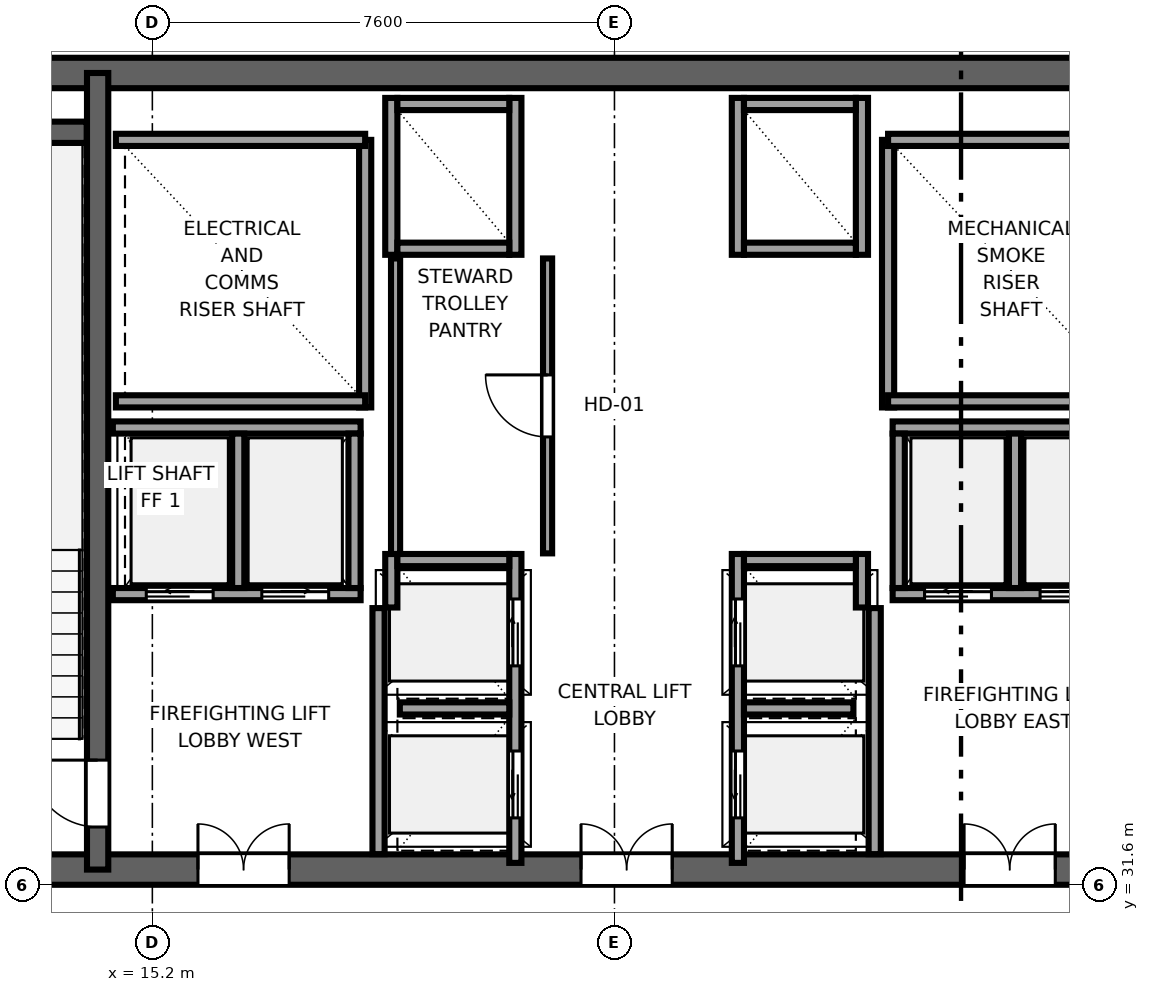
"""IFC4 building model, lengths in metres.
Left out: names, types, materials, properties, quantities, classifications, styles, units other than length and angle.
Written with IfcOpenShell. Run it as: python <this file> out.ifc"""

import sys

from ifc_helpers import new_model, si_unit, direction, frame, frame_2d, origin, place, context, subcontext, project, spatial, rectangle, extrude, source, transform, mapped, element, fill, save


model = new_model("IFC4")
c1 = context("Model", 3, precision=1e-05, world=origin(), true_north=direction((0.0, 1.0)))
c2 = subcontext(c1, "Body", "Model", "MODEL_VIEW")
j1 = project(units=[si_unit("LENGTHUNIT", "METRE"), si_unit("PLANEANGLEUNIT", "RADIAN")], contexts=[c1])
p1 = place(None, origin())
s1 = spatial("IfcSite", under=j1, at=p1, CompositionType="ELEMENT")
p2 = place(p1, origin())
s2 = spatial("IfcBuilding", under=s1, at=p2, CompositionType="ELEMENT")
p3 = place(p2, frame((0.0, 0.0, 209.7)))
s3 = spatial("IfcBuildingStorey", under=s2, at=p3, CompositionType="ELEMENT", Elevation=209.7)
p4 = place(p3, frame((10.0, 31.85, 0.0), z_axis=(0.0, 0.0, 1.0), x_axis=(1.0, 0.0, 0.0)))
e1 = element("IfcWall", 1, at=p4, inside=s3, PredefinedType="SHEAR", context=c2, shape_type="SweptSolid", body=[
    extrude(rectangle(XDim=26.0, YDim=0.5, at=frame_2d((13.0, 0.0))), origin(), (0.0, 0.0, 1.0), 3.55),
])
p5 = place(p4, frame((7.45, 0.0, 0.0), z_axis=(0.0, 0.0, 1.0), x_axis=(-1.0, 0.0, 0.0)))
e2 = element("IfcOpeningElement", 2, at=p5, cuts=e1, PredefinedType="OPENING", context=c2, shape_type="SweptSolid", body=[
    extrude(rectangle(XDim=1.5, YDim=2.04, at=frame_2d((0.75, 1.02))), frame((0.0, 0.26, 0.0), z_axis=(0.0, -1.0, 0.0), x_axis=(1.0, 0.0, 0.0)), (0.0, 0.0, 1.0), 0.52),
])
p6 = place(p4, frame((13.75, 0.0, 0.0), z_axis=(0.0, 0.0, 1.0), x_axis=(-1.0, 0.0, 0.0)))
e3 = element("IfcOpeningElement", 3, at=p6, cuts=e1, PredefinedType="OPENING", context=c2, shape_type="SweptSolid", body=[
    extrude(rectangle(XDim=1.5, YDim=2.04, at=frame_2d((0.75, 1.02))), frame((0.0, 0.26, 0.0), z_axis=(0.0, -1.0, 0.0), x_axis=(1.0, 0.0, 0.0)), (0.0, 0.0, 1.0), 0.52),
])
p7 = place(p4, frame((20.05, 0.0, 0.0), z_axis=(0.0, 0.0, 1.0), x_axis=(-1.0, 0.0, 0.0)))
e4 = element("IfcOpeningElement", 4, at=p7, cuts=e1, PredefinedType="OPENING", context=c2, shape_type="SweptSolid", body=[
    extrude(rectangle(XDim=1.5, YDim=2.04, at=frame_2d((0.75, 1.02))), frame((0.0, 0.26, 0.0), z_axis=(0.0, -1.0, 0.0), x_axis=(1.0, 0.0, 0.0)), (0.0, 0.0, 1.0), 0.52),
])
p8 = place(p3, frame((10.0, 44.95, 0.0), z_axis=(0.0, 0.0, 1.0), x_axis=(1.0, 0.0, 0.0)))
e5 = element("IfcWall", 5, at=p8, inside=s3, PredefinedType="SHEAR", context=c2, shape_type="SweptSolid", body=[
    extrude(rectangle(XDim=26.0, YDim=0.5, at=frame_2d((13.0, 0.0))), origin(), (0.0, 0.0, 1.0), 3.55),
])
p9 = place(p3, frame((14.3, 31.85, 0.0), z_axis=(0.0, 0.0, 1.0), x_axis=(0.0, 1.0, 0.0)))
e6 = element("IfcWall", 6, at=p9, inside=s3, PredefinedType="SHEAR", context=c2, shape_type="SweptSolid", body=[
    extrude(rectangle(XDim=13.1, YDim=0.35, at=frame_2d((6.55, 0.0))), origin(), (0.0, 0.0, 1.0), 3.55),
])
p10 = place(p9, frame((0.7, 0.0, 0.0)))
e7 = element("IfcOpeningElement", 7, at=p10, cuts=e6, PredefinedType="OPENING", context=c2, shape_type="SweptSolid", body=[
    extrude(rectangle(XDim=1.1, YDim=2.12, at=frame_2d((0.55, 1.06))), frame((0.0, 0.185, 0.0), z_axis=(0.0, -1.0, 0.0), x_axis=(1.0, 0.0, 0.0)), (0.0, 0.0, 1.0), 0.37),
])
p11 = place(p3, frame((10.52, 43.975, 0.0), z_axis=(0.0, 0.0, 1.0), x_axis=(1.0, 0.0, 0.0)))
e8 = element("IfcWall", 8, at=p11, inside=s3, PredefinedType="SHEAR", context=c2, shape_type="SweptSolid", body=[
    extrude(rectangle(XDim=3.6, YDim=0.35, at=frame_2d((1.8, 0.0))), origin(), (0.0, 0.0, 1.0), 3.55),
])
p12 = place(p3, frame((18.7, 39.45, 0.0), z_axis=(0.0, 0.0, 1.0), x_axis=(0.0, 1.0, 0.0)))
e9 = element("IfcWall", 9, at=p12, inside=s3, PredefinedType="SOLIDWALL", context=c2, shape_type="SweptSolid", body=[
    extrude(rectangle(XDim=4.4, YDim=0.2, at=frame_2d((2.2, 0.0))), origin(), (0.0, 0.0, 1.0), 3.37),
])
for number, where, z_axis, x_axis in (
    (10, (14.6, 39.55, 0.0), (0.0, 0.0, 1.0), (1.0, 0.0, 0.0)),
    (11, (14.6, 43.85, 0.0), (0.0, 0.0, 1.0), (1.0, 0.0, 0.0)),
):
    element("IfcWall", number, at=place(p3, frame(where, z_axis=z_axis, x_axis=x_axis)), inside=s3, PredefinedType="SOLIDWALL", context=c2, shape_type="SweptSolid", body=[
        extrude(rectangle(XDim=4.1, YDim=0.2, at=frame_2d((2.05, 0.0))), origin(), (0.0, 0.0, 1.0), 3.37),
    ])
p13 = place(p3, frame((27.3, 39.45, 0.0), z_axis=(0.0, 0.0, 1.0), x_axis=(0.0, 1.0, 0.0)))
e12 = element("IfcWall", 12, at=p13, inside=s3, PredefinedType="SOLIDWALL", context=c2, shape_type="SweptSolid", body=[
    extrude(rectangle(XDim=4.4, YDim=0.2, at=frame_2d((2.2, 0.0))), origin(), (0.0, 0.0, 1.0), 3.37),
])
for number, where, z_axis, x_axis in (
    (13, (27.3, 39.55, 0.0), (0.0, 0.0, 1.0), (1.0, 0.0, 0.0)),
    (14, (27.3, 43.85, 0.0), (0.0, 0.0, 1.0), (1.0, 0.0, 0.0)),
):
    element("IfcWall", number, at=place(p3, frame(where, z_axis=z_axis, x_axis=x_axis)), inside=s3, PredefinedType="SOLIDWALL", context=c2, shape_type="SweptSolid", body=[
        extrude(rectangle(XDim=4.1, YDim=0.2, at=frame_2d((2.05, 0.0))), origin(), (0.0, 0.0, 1.0), 3.37),
    ])
for number, where, z_axis, x_axis in (
    (15, (18.92, 32.104, 0.0), (0.0, 0.0, 1.0), (0.0, 1.0, 0.0)),
    (16, (27.08, 32.104, 0.0), (0.0, 0.0, 1.0), (0.0, 1.0, 0.0)),
):
    element("IfcWall", number, at=place(p3, frame(where, z_axis=z_axis, x_axis=x_axis)), inside=s3, PredefinedType="SOLIDWALL", context=c2, shape_type="SweptSolid", body=[
        extrude(rectangle(XDim=4.046, YDim=0.2, at=frame_2d((2.023, 0.0))), origin(), (0.0, 0.0, 1.0), 3.37),
    ])
p14 = place(p3, frame((21.17, 31.96, 0.0), z_axis=(0.0, 0.0, 1.0), x_axis=(0.0, 1.0, 0.0)))
e17 = element("IfcWall", 17, at=p14, inside=s3, PredefinedType="SOLIDWALL", context=c2, shape_type="SweptSolid", body=[
    extrude(rectangle(XDim=5.08, YDim=0.2, at=frame_2d((2.54, 0.0))), origin(), (0.0, 0.0, 1.0), 3.37),
])
p15 = place(p14, frame((0.74, 0.0, 0.0)))
e18 = element("IfcOpeningElement", 18, at=p15, cuts=e17, PredefinedType="OPENING", context=c2, shape_type="SweptSolid", body=[
    extrude(rectangle(XDim=1.1, YDim=2.12, at=frame_2d((0.55, 1.06))), frame((0.0, 0.11, 0.0), z_axis=(0.0, -1.0, 0.0), x_axis=(1.0, 0.0, 0.0)), (0.0, 0.0, 1.0), 0.22),
])
p16 = place(p14, frame((3.24, 0.0, 0.0)))
e19 = element("IfcOpeningElement", 19, at=p16, cuts=e17, PredefinedType="OPENING", context=c2, shape_type="SweptSolid", body=[
    extrude(rectangle(XDim=1.1, YDim=2.12, at=frame_2d((0.55, 1.06))), frame((0.0, 0.11, 0.0), z_axis=(0.0, -1.0, 0.0), x_axis=(1.0, 0.0, 0.0)), (0.0, 0.0, 1.0), 0.22),
])
p17 = place(p3, frame((19.13, 36.16, 0.0), z_axis=(0.0, 0.0, 1.0), x_axis=(0.0, 1.0, 0.0)))
e20 = element("IfcWall", 20, at=p17, inside=s3, PredefinedType="SOLIDWALL", context=c2, shape_type="SweptSolid", body=[
    extrude(rectangle(XDim=0.88, YDim=0.2, at=frame_2d((0.44, 0.0))), origin(), (0.0, 0.0, 1.0), 3.37),
])
p18 = place(p3, frame((19.23, 36.94, 0.0), z_axis=(0.0, 0.0, 1.0), x_axis=(1.0, 0.0, 0.0)))
e21 = element("IfcWall", 21, at=p18, inside=s3, PredefinedType="SOLIDWALL", context=c2, shape_type="SweptSolid", body=[
    extrude(rectangle(XDim=1.84, YDim=0.2, at=frame_2d((0.92, 0.0))), origin(), (0.0, 0.0, 1.0), 3.37),
])
p19 = place(p3, frame((19.27, 34.5, 0.0), z_axis=(0.0, 0.0, 1.0), x_axis=(1.0, 0.0, 0.0)))
e22 = element("IfcWall", 22, at=p19, inside=s3, PredefinedType="SOLIDWALL", context=c2, shape_type="SweptSolid", body=[
    extrude(rectangle(XDim=1.8, YDim=0.2, at=frame_2d((0.9, 0.0))), origin(), (0.0, 0.0, 1.0), 3.37),
])
for number, where, z_axis, x_axis in (
    (23, (21.17, 41.96, 0.0), (0.0, 0.0, 1.0), (0.0, 1.0, 0.0)),
    (24, (19.13, 41.96, 0.0), (0.0, 0.0, 1.0), (0.0, 1.0, 0.0)),
):
    element("IfcWall", number, at=place(p3, frame(where, z_axis=z_axis, x_axis=x_axis)), inside=s3, PredefinedType="SOLIDWALL", context=c2, shape_type="SweptSolid", body=[
        extrude(rectangle(XDim=2.58, YDim=0.2, at=frame_2d((1.29, 0.0))), origin(), (0.0, 0.0, 1.0), 3.37),
    ])
for number, where, z_axis, x_axis in (
    (25, (19.23, 42.06, 0.0), (0.0, 0.0, 1.0), (1.0, 0.0, 0.0)),
    (26, (19.23, 44.44, 0.0), (0.0, 0.0, 1.0), (1.0, 0.0, 0.0)),
):
    element("IfcWall", number, at=place(p3, frame(where, z_axis=z_axis, x_axis=x_axis)), inside=s3, PredefinedType="SOLIDWALL", context=c2, shape_type="SweptSolid", body=[
        extrude(rectangle(XDim=1.84, YDim=0.2, at=frame_2d((0.92, 0.0))), origin(), (0.0, 0.0, 1.0), 3.37),
    ])
p20 = place(p3, frame((27.375, 36.38, 0.0), z_axis=(0.0, 0.0, 1.0), x_axis=(1.0, 0.0, 0.0)))
e27 = element("IfcWall", 27, at=p20, inside=s3, PredefinedType="SOLIDWALL", context=c2, shape_type="SweptSolid", body=[
    extrude(rectangle(XDim=4.075, YDim=0.2, at=frame_2d((2.038, 0.0))), origin(), (0.0, 0.0, 1.0), 3.37),
])
p21 = place(p20, frame((0.525, 0.0, 0.0)))
e28 = element("IfcOpeningElement", 28, at=p21, cuts=e27, PredefinedType="OPENING", context=c2, shape_type="SweptSolid", body=[
    extrude(rectangle(XDim=1.1, YDim=2.12, at=frame_2d((0.55, 1.06))), frame((0.0, 0.11, 0.0), z_axis=(0.0, -1.0, 0.0), x_axis=(1.0, 0.0, 0.0)), (0.0, 0.0, 1.0), 0.22),
])
p22 = place(p20, frame((2.425, 0.0, 0.0)))
e29 = element("IfcOpeningElement", 29, at=p22, cuts=e27, PredefinedType="OPENING", context=c2, shape_type="SweptSolid", body=[
    extrude(rectangle(XDim=1.1, YDim=2.12, at=frame_2d((0.55, 1.06))), frame((0.0, 0.11, 0.0), z_axis=(0.0, -1.0, 0.0), x_axis=(1.0, 0.0, 0.0)), (0.0, 0.0, 1.0), 0.22),
])
p23 = place(p3, frame((27.375, 39.12, 0.0), z_axis=(0.0, 0.0, 1.0), x_axis=(1.0, 0.0, 0.0)))
e30 = element("IfcWall", 30, at=p23, inside=s3, PredefinedType="SOLIDWALL", context=c2, shape_type="SweptSolid", body=[
    extrude(rectangle(XDim=4.075, YDim=0.2, at=frame_2d((2.038, 0.0))), origin(), (0.0, 0.0, 1.0), 3.37),
])
for number, where, z_axis, x_axis in (
    (31, (27.475, 36.48, 0.0), (0.0, 0.0, 1.0), (0.0, 1.0, 0.0)),
    (32, (29.387, 36.48, 0.0), (0.0, 0.0, 1.0), (0.0, 1.0, 0.0)),
):
    element("IfcWall", number, at=place(p3, frame(where, z_axis=z_axis, x_axis=x_axis)), inside=s3, PredefinedType="SOLIDWALL", context=c2, shape_type="SweptSolid", body=[
        extrude(rectangle(XDim=2.54, YDim=0.2, at=frame_2d((1.27, 0.0))), origin(), (0.0, 0.0, 1.0), 3.37),
    ])
p24 = place(p3, frame((14.55, 36.38, 0.0), z_axis=(0.0, 0.0, 1.0), x_axis=(1.0, 0.0, 0.0)))
e33 = element("IfcWall", 33, at=p24, inside=s3, PredefinedType="SOLIDWALL", context=c2, shape_type="SweptSolid", body=[
    extrude(rectangle(XDim=4.075, YDim=0.2, at=frame_2d((2.038, 0.0))), origin(), (0.0, 0.0, 1.0), 3.37),
])
p25 = place(p24, frame((0.55, 0.0, 0.0)))
e34 = element("IfcOpeningElement", 34, at=p25, cuts=e33, PredefinedType="OPENING", context=c2, shape_type="SweptSolid", body=[
    extrude(rectangle(XDim=1.1, YDim=2.12, at=frame_2d((0.55, 1.06))), frame((0.0, 0.11, 0.0), z_axis=(0.0, -1.0, 0.0), x_axis=(1.0, 0.0, 0.0)), (0.0, 0.0, 1.0), 0.22),
])
p26 = place(p24, frame((2.45, 0.0, 0.0)))
e35 = element("IfcOpeningElement", 35, at=p26, cuts=e33, PredefinedType="OPENING", context=c2, shape_type="SweptSolid", body=[
    extrude(rectangle(XDim=1.1, YDim=2.12, at=frame_2d((0.55, 1.06))), frame((0.0, 0.11, 0.0), z_axis=(0.0, -1.0, 0.0), x_axis=(1.0, 0.0, 0.0)), (0.0, 0.0, 1.0), 0.22),
])
p27 = place(p3, frame((14.55, 39.12, 0.0), z_axis=(0.0, 0.0, 1.0), x_axis=(1.0, 0.0, 0.0)))
e36 = element("IfcWall", 36, at=p27, inside=s3, PredefinedType="SOLIDWALL", context=c2, shape_type="SweptSolid", body=[
    extrude(rectangle(XDim=4.075, YDim=0.2, at=frame_2d((2.038, 0.0))), origin(), (0.0, 0.0, 1.0), 3.37),
])
for number, where, z_axis, x_axis in (
    (37, (18.525, 36.48, 0.0), (0.0, 0.0, 1.0), (0.0, 1.0, 0.0)),
    (38, (16.613, 36.48, 0.0), (0.0, 0.0, 1.0), (0.0, 1.0, 0.0)),
):
    element("IfcWall", number, at=place(p3, frame(where, z_axis=z_axis, x_axis=x_axis)), inside=s3, PredefinedType="SOLIDWALL", context=c2, shape_type="SweptSolid", body=[
        extrude(rectangle(XDim=2.54, YDim=0.2, at=frame_2d((1.27, 0.0))), origin(), (0.0, 0.0, 1.0), 3.37),
    ])
p28 = place(p3, frame((24.83, 31.96, 0.0), z_axis=(0.0, 0.0, 1.0), x_axis=(0.0, 1.0, 0.0)))
e39 = element("IfcWall", 39, at=p28, inside=s3, PredefinedType="SOLIDWALL", context=c2, shape_type="SweptSolid", body=[
    extrude(rectangle(XDim=5.08, YDim=0.2, at=frame_2d((2.54, 0.0))), origin(), (0.0, 0.0, 1.0), 3.37),
])
p29 = place(p28, frame((0.74, 0.0, 0.0)))
e40 = element("IfcOpeningElement", 40, at=p29, cuts=e39, PredefinedType="OPENING", context=c2, shape_type="SweptSolid", body=[
    extrude(rectangle(XDim=1.1, YDim=2.12, at=frame_2d((0.55, 1.06))), frame((0.0, 0.11, 0.0), z_axis=(0.0, -1.0, 0.0), x_axis=(1.0, 0.0, 0.0)), (0.0, 0.0, 1.0), 0.22),
])
p30 = place(p28, frame((3.24, 0.0, 0.0)))
e41 = element("IfcOpeningElement", 41, at=p30, cuts=e39, PredefinedType="OPENING", context=c2, shape_type="SweptSolid", body=[
    extrude(rectangle(XDim=1.1, YDim=2.12, at=frame_2d((0.55, 1.06))), frame((0.0, 0.11, 0.0), z_axis=(0.0, -1.0, 0.0), x_axis=(1.0, 0.0, 0.0)), (0.0, 0.0, 1.0), 0.22),
])
p31 = place(p3, frame((26.87, 36.16, 0.0), z_axis=(0.0, 0.0, 1.0), x_axis=(0.0, 1.0, 0.0)))
e42 = element("IfcWall", 42, at=p31, inside=s3, PredefinedType="SOLIDWALL", context=c2, shape_type="SweptSolid", body=[
    extrude(rectangle(XDim=0.88, YDim=0.2, at=frame_2d((0.44, 0.0))), origin(), (0.0, 0.0, 1.0), 3.37),
])
p32 = place(p3, frame((24.93, 36.94, 0.0), z_axis=(0.0, 0.0, 1.0), x_axis=(1.0, 0.0, 0.0)))
e43 = element("IfcWall", 43, at=p32, inside=s3, PredefinedType="SOLIDWALL", context=c2, shape_type="SweptSolid", body=[
    extrude(rectangle(XDim=1.84, YDim=0.2, at=frame_2d((0.92, 0.0))), origin(), (0.0, 0.0, 1.0), 3.37),
])
p33 = place(p3, frame((24.93, 34.5, 0.0), z_axis=(0.0, 0.0, 1.0), x_axis=(1.0, 0.0, 0.0)))
e44 = element("IfcWall", 44, at=p33, inside=s3, PredefinedType="SOLIDWALL", context=c2, shape_type="SweptSolid", body=[
    extrude(rectangle(XDim=1.8, YDim=0.2, at=frame_2d((0.9, 0.0))), origin(), (0.0, 0.0, 1.0), 3.37),
])
for number, where, z_axis, x_axis in (
    (45, (24.83, 41.96, 0.0), (0.0, 0.0, 1.0), (0.0, 1.0, 0.0)),
    (46, (26.87, 41.96, 0.0), (0.0, 0.0, 1.0), (0.0, 1.0, 0.0)),
):
    element("IfcWall", number, at=place(p3, frame(where, z_axis=z_axis, x_axis=x_axis)), inside=s3, PredefinedType="SOLIDWALL", context=c2, shape_type="SweptSolid", body=[
        extrude(rectangle(XDim=2.58, YDim=0.2, at=frame_2d((1.29, 0.0))), origin(), (0.0, 0.0, 1.0), 3.37),
    ])
for number, where, z_axis, x_axis in (
    (47, (24.93, 42.06, 0.0), (0.0, 0.0, 1.0), (1.0, 0.0, 0.0)),
    (48, (24.93, 44.44, 0.0), (0.0, 0.0, 1.0), (1.0, 0.0, 0.0)),
):
    element("IfcWall", number, at=place(p3, frame(where, z_axis=z_axis, x_axis=x_axis)), inside=s3, PredefinedType="SOLIDWALL", context=c2, shape_type="SweptSolid", body=[
        extrude(rectangle(XDim=1.84, YDim=0.2, at=frame_2d((0.92, 0.0))), origin(), (0.0, 0.0, 1.0), 3.37),
    ])
p34 = place(p3, frame((21.7, 37.05, 0.0), z_axis=(0.0, 0.0, 1.0), x_axis=(0.0, 1.0, 0.0)))
e49 = element("IfcWall", 49, at=p34, inside=s3, PredefinedType="PARTITIONING", context=c2, shape_type="SweptSolid", body=[
    extrude(rectangle(XDim=4.85, YDim=0.15, at=frame_2d((2.425, 0.0))), origin(), (0.0, 0.0, 1.0), 3.37),
])
p35 = place(p34, frame((1.915, 0.0, 0.0)))
e50 = element("IfcOpeningElement", 50, at=p35, cuts=e49, PredefinedType="OPENING", context=c2, shape_type="SweptSolid", body=[
    extrude(rectangle(XDim=1.02, YDim=2.03, at=frame_2d((0.51, 1.015))), frame((0.0, 0.085, 0.0), z_axis=(0.0, -1.0, 0.0), x_axis=(1.0, 0.0, 0.0)), (0.0, 0.0, 1.0), 0.17),
])
p36 = place(p3, frame((19.2, 37.04, 0.0), z_axis=(0.0, 0.0, 1.0), x_axis=(0.0, 1.0, 0.0)))
e51 = element("IfcWall", 51, at=p36, inside=s3, PredefinedType="PARTITIONING", context=c2, shape_type="SweptSolid", body=[
    extrude(rectangle(XDim=4.86, YDim=0.15, at=frame_2d((2.43, 0.0))), origin(), (0.0, 0.0, 1.0), 3.37),
])
m1 = source(origin(), c2, "Body", "SweptSolid", [
    extrude(rectangle(XDim=1.1, YDim=2.12, at=frame_2d((0.55, 1.06))), frame((0.0, 0.025, 0.0), z_axis=(0.0, -1.0, 0.0), x_axis=(1.0, 0.0, 0.0)), (0.0, 0.0, 1.0), 0.05),
])
p37 = place(p10, origin())
e52 = element("IfcDoor", 52, at=p37, inside=s3, OperationType="SINGLE_SWING_RIGHT", PredefinedType="DOOR", context=c2, shape_type="MappedRepresentation", body=[
    mapped(m1, transform((0.0, 0.0, 0.0), x_axis=(1.0, 0.0, 0.0), y_axis=(0.0, 1.0, 0.0), z_axis=(0.0, 0.0, 1.0), scale=1.0)),
])
fill(e7, e52)
m2 = source(origin(), c2, "Body", "SweptSolid", [
    extrude(rectangle(XDim=1.5, YDim=2.04, at=frame_2d((0.75, 1.02))), frame((0.0, 0.025, 0.0), z_axis=(0.0, -1.0, 0.0), x_axis=(1.0, 0.0, 0.0)), (0.0, 0.0, 1.0), 0.05),
])
p38 = place(p5, origin())
e53 = element("IfcDoor", 53, at=p38, inside=s3, OperationType="DOUBLE_DOOR_SINGLE_SWING", PredefinedType="DOOR", context=c2, shape_type="MappedRepresentation", body=[
    mapped(m2, transform((0.0, 0.0, 0.0), x_axis=(1.0, 0.0, 0.0), y_axis=(0.0, 1.0, 0.0), z_axis=(0.0, 0.0, 1.0), scale=1.0)),
])
fill(e2, e53)
p39 = place(p6, origin())
e54 = element("IfcDoor", 54, at=p39, inside=s3, OperationType="DOUBLE_DOOR_SINGLE_SWING", PredefinedType="DOOR", context=c2, shape_type="MappedRepresentation", body=[
    mapped(m2, transform((0.0, 0.0, 0.0), x_axis=(1.0, 0.0, 0.0), y_axis=(0.0, 1.0, 0.0), z_axis=(0.0, 0.0, 1.0), scale=1.0)),
])
fill(e3, e54)
p40 = place(p7, origin())
e55 = element("IfcDoor", 55, at=p40, inside=s3, OperationType="DOUBLE_DOOR_SINGLE_SWING", PredefinedType="DOOR", context=c2, shape_type="MappedRepresentation", body=[
    mapped(m2, transform((0.0, 0.0, 0.0), x_axis=(1.0, 0.0, 0.0), y_axis=(0.0, 1.0, 0.0), z_axis=(0.0, 0.0, 1.0), scale=1.0)),
])
fill(e4, e55)
m3 = source(origin(), c2, "Body", "SweptSolid", [
    extrude(rectangle(XDim=1.1, YDim=2.12, at=frame_2d((0.55, 1.06))), frame((0.0, 0.025, 0.0), z_axis=(0.0, -1.0, 0.0), x_axis=(1.0, 0.0, 0.0)), (0.0, 0.0, 1.0), 0.05),
])
p41 = place(p15, origin())
e56 = element("IfcDoor", 56, at=p41, inside=s3, OperationType="SLIDING_TO_LEFT", PredefinedType="DOOR", context=c2, shape_type="MappedRepresentation", body=[
    mapped(m3, transform((0.0, 0.0, 0.0), x_axis=(1.0, 0.0, 0.0), y_axis=(0.0, 1.0, 0.0), z_axis=(0.0, 0.0, 1.0), scale=1.0)),
])
fill(e18, e56)
p42 = place(p16, origin())
e57 = element("IfcDoor", 57, at=p42, inside=s3, OperationType="SLIDING_TO_RIGHT", PredefinedType="DOOR", context=c2, shape_type="MappedRepresentation", body=[
    mapped(m3, transform((0.0, 0.0, 0.0), x_axis=(1.0, 0.0, 0.0), y_axis=(0.0, 1.0, 0.0), z_axis=(0.0, 0.0, 1.0), scale=1.0)),
])
fill(e19, e57)
p43 = place(p21, origin())
e58 = element("IfcDoor", 58, at=p43, inside=s3, OperationType="SLIDING_TO_LEFT", PredefinedType="DOOR", context=c2, shape_type="MappedRepresentation", body=[
    mapped(m3, transform((0.0, 0.0, 0.0), x_axis=(1.0, 0.0, 0.0), y_axis=(0.0, 1.0, 0.0), z_axis=(0.0, 0.0, 1.0), scale=1.0)),
])
fill(e28, e58)
p44 = place(p22, origin())
e59 = element("IfcDoor", 59, at=p44, inside=s3, OperationType="SLIDING_TO_RIGHT", PredefinedType="DOOR", context=c2, shape_type="MappedRepresentation", body=[
    mapped(m3, transform((0.0, 0.0, 0.0), x_axis=(1.0, 0.0, 0.0), y_axis=(0.0, 1.0, 0.0), z_axis=(0.0, 0.0, 1.0), scale=1.0)),
])
fill(e29, e59)
p45 = place(p25, origin())
e60 = element("IfcDoor", 60, at=p45, inside=s3, OperationType="SLIDING_TO_LEFT", PredefinedType="DOOR", context=c2, shape_type="MappedRepresentation", body=[
    mapped(m3, transform((0.0, 0.0, 0.0), x_axis=(1.0, 0.0, 0.0), y_axis=(0.0, 1.0, 0.0), z_axis=(0.0, 0.0, 1.0), scale=1.0)),
])
fill(e34, e60)
p46 = place(p26, origin())
e61 = element("IfcDoor", 61, at=p46, inside=s3, OperationType="SLIDING_TO_RIGHT", PredefinedType="DOOR", context=c2, shape_type="MappedRepresentation", body=[
    mapped(m3, transform((0.0, 0.0, 0.0), x_axis=(1.0, 0.0, 0.0), y_axis=(0.0, 1.0, 0.0), z_axis=(0.0, 0.0, 1.0), scale=1.0)),
])
fill(e35, e61)
p47 = place(p29, origin())
e62 = element("IfcDoor", 62, at=p47, inside=s3, OperationType="SLIDING_TO_LEFT", PredefinedType="DOOR", context=c2, shape_type="MappedRepresentation", body=[
    mapped(m3, transform((0.0, 0.0, 0.0), x_axis=(1.0, 0.0, 0.0), y_axis=(0.0, 1.0, 0.0), z_axis=(0.0, 0.0, 1.0), scale=1.0)),
])
fill(e40, e62)
p48 = place(p30, origin())
e63 = element("IfcDoor", 63, at=p48, inside=s3, OperationType="SLIDING_TO_RIGHT", PredefinedType="DOOR", context=c2, shape_type="MappedRepresentation", body=[
    mapped(m3, transform((0.0, 0.0, 0.0), x_axis=(1.0, 0.0, 0.0), y_axis=(0.0, 1.0, 0.0), z_axis=(0.0, 0.0, 1.0), scale=1.0)),
])
fill(e41, e63)
m4 = source(origin(), c2, "Body", "SweptSolid", [
    extrude(rectangle(XDim=1.02, YDim=2.03, at=frame_2d((0.51, 1.015))), frame((0.0, 0.025, 0.0), z_axis=(0.0, -1.0, 0.0), x_axis=(1.0, 0.0, 0.0)), (0.0, 0.0, 1.0), 0.05),
])
p49 = place(p35, origin())
e64 = element("IfcDoor", 64, at=p49, inside=s3, OperationType="SINGLE_SWING_RIGHT", PredefinedType="DOOR", context=c2, shape_type="MappedRepresentation", body=[
    mapped(m4, transform((0.0, 0.0, 0.0), x_axis=(1.0, 0.0, 0.0), y_axis=(0.0, 1.0, 0.0), z_axis=(0.0, 0.0, 1.0), scale=1.0)),
])
fill(e50, e64)
save(model, sys.argv[1])
